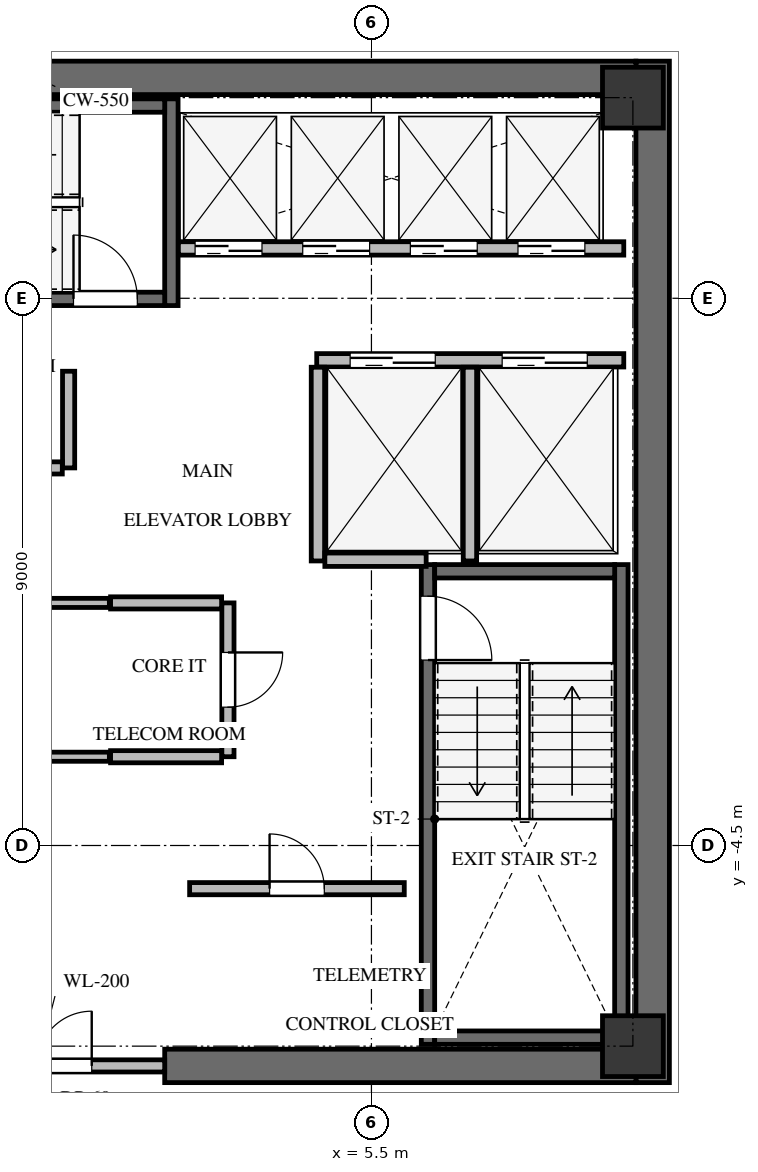
"""IFC4 building model, lengths in metres.
Left out: names, types, materials, properties, quantities, classifications, styles, units other than length and angle.
Written with IfcOpenShell. Run it as: python <this file> out.ifc"""

import sys

from ifc_helpers import new_model, si_unit, direction, frame, frame_2d, origin, origin_2d, place, context, subcontext, project, spatial, rectangle, extrude, source, transform, mapped, element, fill, save


model = new_model("IFC4")
c1 = context("Model", 3, precision=1e-05, world=origin(), true_north=direction((0.0, 1.0)))
c2 = subcontext(c1, "Body", "Model", "MODEL_VIEW")
j1 = project(units=[si_unit("LENGTHUNIT", "METRE"), si_unit("PLANEANGLEUNIT", "RADIAN")], contexts=[c1])
p1 = place(None, origin())
s1 = spatial("IfcSite", under=j1, at=p1, CompositionType="ELEMENT")
p2 = place(p1, origin())
s2 = spatial("IfcBuilding", under=s1, at=p2, CompositionType="ELEMENT")
p3 = place(p2, frame((0.0, 0.0, 218.3)))
s3 = spatial("IfcBuildingStorey", under=s2, at=p3, CompositionType="ELEMENT", Elevation=218.3)
p4 = place(p3, frame((10.125, -8.4, 0.0), z_axis=(0.0, 0.0, 1.0), x_axis=(0.0, 1.0, 0.0)))
e1 = element("IfcWall", 1, at=p4, inside=s3, PredefinedType="SHEAR", context=c2, shape_type="SweptSolid", body=[
    extrude(rectangle(XDim=16.8, YDim=0.55, at=frame_2d((8.4, 0.0))), origin(), (0.0, 0.0, 1.0), 3.3),
])
p5 = place(p3, frame((2.1, -8.125, 0.0), z_axis=(0.0, 0.0, 1.0), x_axis=(1.0, 0.0, 0.0)))
e2 = element("IfcWall", 2, at=p5, inside=s3, PredefinedType="SHEAR", context=c2, shape_type="SweptSolid", body=[
    extrude(rectangle(XDim=7.75, YDim=0.55, at=frame_2d((3.875, 0.0))), origin(), (0.0, 0.0, 1.0), 3.3),
])
p6 = place(p3, frame((-9.85, 8.125, 0.0), z_axis=(0.0, 0.0, 1.0), x_axis=(1.0, 0.0, 0.0)))
e3 = element("IfcWall", 3, at=p6, inside=s3, PredefinedType="SHEAR", context=c2, shape_type="SweptSolid", body=[
    extrude(rectangle(XDim=19.7, YDim=0.55, at=frame_2d((9.85, 0.0))), origin(), (0.0, 0.0, 1.0), 3.3),
])
p7 = place(p3, frame((9.61, -7.77, -0.24), z_axis=(0.0, 0.0, 1.0), x_axis=(0.0, 1.0, 0.0)))
e4 = element("IfcWall", 4, at=p7, inside=s3, PredefinedType="SHEAR", context=c2, shape_type="SweptSolid", body=[
    extrude(rectangle(XDim=7.89, YDim=0.22, at=frame_2d((3.945, 0.0))), origin(), (0.0, 0.0, 1.0), 3.3),
])
p8 = place(p3, frame((6.43, 0.12, -0.24), z_axis=(0.0, 0.0, 1.0), x_axis=(0.0, -1.0, 0.0)))
e5 = element("IfcWall", 5, at=p8, inside=s3, PredefinedType="SHEAR", context=c2, shape_type="SweptSolid", body=[
    extrude(rectangle(XDim=7.89, YDim=0.22, at=frame_2d((3.945, 0.0))), origin(), (0.0, 0.0, 1.0), 3.3),
])
p9 = place(p8, frame((0.52, 0.0, 0.0)))
e6 = element("IfcOpeningElement", 6, at=p9, cuts=e5, PredefinedType="OPENING", context=c2, shape_type="SweptSolid", body=[
    extrude(rectangle(XDim=1.05, YDim=2.15, at=frame_2d((0.525, 1.075))), frame((0.0, 0.12, 0.0), z_axis=(0.0, -1.0, 0.0), x_axis=(1.0, 0.0, 0.0)), (0.0, 0.0, 1.0), 0.24),
])
for number, where, z_axis, x_axis in (
    (7, (6.54, -7.66, -0.24), (0.0, 0.0, 1.0), (1.0, 0.0, 0.0)),
    (8, (9.5, 0.01, -0.24), (0.0, 0.0, 1.0), (-1.0, 0.0, 0.0)),
):
    element("IfcWall", number, at=place(p3, frame(where, z_axis=z_axis, x_axis=x_axis)), inside=s3, PredefinedType="SHEAR", context=c2, shape_type="SweptSolid", body=[
        extrude(rectangle(XDim=2.96, YDim=0.22, at=frame_2d((1.48, 0.0))), origin(), (0.0, 0.0, 1.0), 3.3),
    ])
p10 = place(p3, frame((2.21, 4.38, -0.24), z_axis=(0.0, 0.0, 1.0), x_axis=(0.0, 1.0, 0.0)))
e9 = element("IfcWall", 9, at=p10, inside=s3, PredefinedType="SHEAR", context=c2, shape_type="SweptSolid", body=[
    extrude(rectangle(XDim=3.4, YDim=0.22, at=frame_2d((1.7, 0.0))), origin(), (0.0, 0.0, 1.0), 3.3),
])
p11 = place(p3, frame((-5.25, 4.49, -0.24), z_axis=(0.0, 0.0, 1.0), x_axis=(1.0, 0.0, 0.0)))
e10 = element("IfcWall", 10, at=p11, inside=s3, PredefinedType="SHEAR", context=c2, shape_type="SweptSolid", body=[
    extrude(rectangle(XDim=7.35, YDim=0.22, at=frame_2d((3.675, 0.0))), origin(), (0.0, 0.0, 1.0), 3.3),
])
p12 = place(p11, frame((5.85, 0.0, 0.0)))
e11 = element("IfcOpeningElement", 11, at=p12, cuts=e10, PredefinedType="OPENING", context=c2, shape_type="SweptSolid", body=[
    extrude(rectangle(XDim=1.05, YDim=2.15, at=frame_2d((0.525, 1.075))), frame((0.0, 0.12, 0.0), z_axis=(0.0, -1.0, 0.0), x_axis=(1.0, 0.0, 0.0)), (0.0, 0.0, 1.0), 0.24),
])
p13 = place(p3, frame((2.1, 7.67, -0.24), z_axis=(0.0, 0.0, 1.0), x_axis=(-1.0, 0.0, 0.0)))
e12 = element("IfcWall", 12, at=p13, inside=s3, PredefinedType="SHEAR", context=c2, shape_type="SweptSolid", body=[
    extrude(rectangle(XDim=7.35, YDim=0.22, at=frame_2d((3.675, 0.0))), origin(), (0.0, 0.0, 1.0), 3.3),
])
m1 = source(origin(), c2, "Body", "SweptSolid", [
    extrude(rectangle(XDim=1.0, YDim=1.0, at=origin_2d()), origin(), (0.0, 0.0, 1.0), 3.3),
])
for number, where, z_axis, x_axis in (
    (13, (9.8, -7.8, -0.24), (0.0, 0.0, 1.0), (1.0, 0.0, 0.0)),
    (14, (9.8, 7.8, -0.24), (0.0, 0.0, 1.0), (1.0, 0.0, 0.0)),
):
    element("IfcColumn", number, at=place(p3, frame(where, z_axis=z_axis, x_axis=x_axis)), inside=s3, PredefinedType="COLUMN", context=c2, shape_type="MappedRepresentation", body=[
        mapped(m1, transform((0.0, 0.0, 0.0), x_axis=(1.0, 0.0, 0.0), y_axis=(0.0, 1.0, 0.0), z_axis=(0.0, 0.0, 1.0), scale=1.0)),
    ])
p14 = place(p3, frame((-2.1, -8.125, 0.0), z_axis=(0.0, 0.0, 1.0), x_axis=(1.0, 0.0, 0.0)))
e15 = element("IfcWall", 15, at=p14, inside=s3, PredefinedType="SOLIDWALL", context=c2, shape_type="SweptSolid", body=[
    extrude(rectangle(XDim=4.2, YDim=0.2, at=frame_2d((2.1, 0.0))), origin(), (0.0, 0.0, 1.0), 3.045),
])
p15 = place(p14, frame((1.2, 0.0, 0.0)))
e16 = element("IfcOpeningElement", 16, at=p15, cuts=e15, PredefinedType="OPENING", context=c2, shape_type="SweptSolid", body=[
    extrude(rectangle(XDim=1.8, YDim=2.15, at=frame_2d((0.9, 1.075))), frame((0.0, 0.11, 0.0), z_axis=(0.0, -1.0, 0.0), x_axis=(1.0, 0.0, 0.0)), (0.0, 0.0, 1.0), 0.22),
])
p16 = place(p3, frame((4.6, 3.48, 0.0), z_axis=(0.0, 0.0, 1.0), x_axis=(1.0, 0.0, 0.0)))
e17 = element("IfcWall", 17, at=p16, inside=s3, PredefinedType="SOLIDWALL", context=c2, shape_type="SweptSolid", body=[
    extrude(rectangle(XDim=5.05, YDim=0.22, at=frame_2d((2.525, 0.0))), origin(), (0.0, 0.0, 1.0), 3.045),
])
p17 = place(p16, frame((0.55, 0.0, 0.0)))
e18 = element("IfcOpeningElement", 18, at=p17, cuts=e17, PredefinedType="OPENING", context=c2, shape_type="SweptSolid", body=[
    extrude(rectangle(XDim=1.4, YDim=2.15, at=frame_2d((0.7, 1.075))), frame((0.0, 0.12, 0.0), z_axis=(0.0, -1.0, 0.0), x_axis=(1.0, 0.0, 0.0)), (0.0, 0.0, 1.0), 0.24),
])
p18 = place(p16, frame((3.05, 0.0, 0.0)))
e19 = element("IfcOpeningElement", 19, at=p18, cuts=e17, PredefinedType="OPENING", context=c2, shape_type="SweptSolid", body=[
    extrude(rectangle(XDim=1.4, YDim=2.15, at=frame_2d((0.7, 1.075))), frame((0.0, 0.12, 0.0), z_axis=(0.0, -1.0, 0.0), x_axis=(1.0, 0.0, 0.0)), (0.0, 0.0, 1.0), 0.24),
])
for number, where, z_axis, x_axis in (
    (20, (4.62, 0.18, 0.0), (0.0, 0.0, 1.0), (0.0, 1.0, 0.0)),
    (21, (7.12, 0.18, 0.0), (0.0, 0.0, 1.0), (0.0, 1.0, 0.0)),
):
    element("IfcWall", number, at=place(p3, frame(where, z_axis=z_axis, x_axis=x_axis)), inside=s3, PredefinedType="SOLIDWALL", context=c2, shape_type="SweptSolid", body=[
        extrude(rectangle(XDim=3.186, YDim=0.22, at=frame_2d((1.593, 0.0))), origin(), (0.0, 0.0, 1.0), 3.045),
    ])
p19 = place(p3, frame((4.734, 0.2, 0.0), z_axis=(0.0, 0.0, 1.0), x_axis=(1.0, 0.0, 0.0)))
e22 = element("IfcWall", 22, at=p19, inside=s3, PredefinedType="SOLIDWALL", context=c2, shape_type="SweptSolid", body=[
    extrude(rectangle(XDim=1.666, YDim=0.22, at=frame_2d((0.833, 0.0))), origin(), (0.0, 0.0, 1.0), 3.045),
])
p20 = place(p3, frame((2.325, 5.32, 0.0), z_axis=(0.0, 0.0, 1.0), x_axis=(1.0, 0.0, 0.0)))
e23 = element("IfcWall", 23, at=p20, inside=s3, PredefinedType="SOLIDWALL", context=c2, shape_type="SweptSolid", body=[
    extrude(rectangle(XDim=7.325, YDim=0.22, at=frame_2d((3.663, 0.0))), origin(), (0.0, 0.0, 1.0), 3.045),
])
p21 = place(p20, frame((0.275, 0.0, 0.0)))
e24 = element("IfcOpeningElement", 24, at=p21, cuts=e23, PredefinedType="OPENING", context=c2, shape_type="SweptSolid", body=[
    extrude(rectangle(XDim=1.1, YDim=2.15, at=frame_2d((0.55, 1.075))), frame((0.0, 0.12, 0.0), z_axis=(0.0, -1.0, 0.0), x_axis=(1.0, 0.0, 0.0)), (0.0, 0.0, 1.0), 0.24),
])
p22 = place(p20, frame((2.045, 0.0, 0.0)))
e25 = element("IfcOpeningElement", 25, at=p22, cuts=e23, PredefinedType="OPENING", context=c2, shape_type="SweptSolid", body=[
    extrude(rectangle(XDim=1.1, YDim=2.15, at=frame_2d((0.55, 1.075))), frame((0.0, 0.12, 0.0), z_axis=(0.0, -1.0, 0.0), x_axis=(1.0, 0.0, 0.0)), (0.0, 0.0, 1.0), 0.24),
])
p23 = place(p20, frame((3.815, 0.0, 0.0)))
e26 = element("IfcOpeningElement", 26, at=p23, cuts=e23, PredefinedType="OPENING", context=c2, shape_type="SweptSolid", body=[
    extrude(rectangle(XDim=1.1, YDim=2.15, at=frame_2d((0.55, 1.075))), frame((0.0, 0.12, 0.0), z_axis=(0.0, -1.0, 0.0), x_axis=(1.0, 0.0, 0.0)), (0.0, 0.0, 1.0), 0.24),
])
p24 = place(p20, frame((5.585, 0.0, 0.0)))
e27 = element("IfcOpeningElement", 27, at=p24, cuts=e23, PredefinedType="OPENING", context=c2, shape_type="SweptSolid", body=[
    extrude(rectangle(XDim=1.1, YDim=2.15, at=frame_2d((0.55, 1.075))), frame((0.0, 0.12, 0.0), z_axis=(0.0, -1.0, 0.0), x_axis=(1.0, 0.0, 0.0)), (0.0, 0.0, 1.0), 0.24),
])
p25 = place(p3, frame((2.51, -5.21, 0.0), z_axis=(0.0, 0.0, 1.0), x_axis=(1.0, 0.0, 0.0)))
e28 = element("IfcWall", 28, at=p25, inside=s3, PredefinedType="SOLIDWALL", context=c2, shape_type="SweptSolid", body=[
    extrude(rectangle(XDim=3.53, YDim=0.2, at=frame_2d((1.765, 0.0))), origin(), (0.0, 0.0, 1.0), 3.045),
])
p26 = place(p25, frame((1.315, 0.0, 0.0)))
e29 = element("IfcOpeningElement", 29, at=p26, cuts=e28, PredefinedType="OPENING", context=c2, shape_type="SweptSolid", body=[
    extrude(rectangle(XDim=0.9, YDim=2.05, at=frame_2d((0.45, 1.025))), frame((0.0, 0.11, 0.0), z_axis=(0.0, -1.0, 0.0), x_axis=(1.0, 0.0, 0.0)), (0.0, 0.0, 1.0), 0.22),
])
p27 = place(p3, frame((1.19, -3.04, 0.0), z_axis=(0.0, 0.0, 1.0), x_axis=(-1.0, 0.0, 0.0)))
e30 = element("IfcWall", 30, at=p27, inside=s3, PredefinedType="PARTITIONING", context=c2, shape_type="SweptSolid", body=[
    extrude(rectangle(XDim=5.53, YDim=0.15, at=frame_2d((2.765, 0.0))), origin(), (0.0, 0.0, 1.0), 3.045),
])
p28 = place(p27, frame((2.315, 0.0, 0.0)))
e31 = element("IfcOpeningElement", 31, at=p28, cuts=e30, PredefinedType="OPENING", context=c2, shape_type="SweptSolid", body=[
    extrude(rectangle(XDim=0.9, YDim=2.05, at=frame_2d((0.45, 1.025))), frame((0.0, 0.085, 0.0), z_axis=(0.0, -1.0, 0.0), x_axis=(1.0, 0.0, 0.0)), (0.0, 0.0, 1.0), 0.17),
])
p29 = place(p3, frame((-4.34, -0.51, 0.0), z_axis=(0.0, 0.0, 1.0), x_axis=(1.0, 0.0, 0.0)))
e32 = element("IfcWall", 32, at=p29, inside=s3, PredefinedType="PARTITIONING", context=c2, shape_type="SweptSolid", body=[
    extrude(rectangle(XDim=5.53, YDim=0.15, at=frame_2d((2.765, 0.0))), origin(), (0.0, 0.0, 1.0), 3.045),
])
p30 = place(p3, frame((3.14, -0.51, 0.0), z_axis=(0.0, 0.0, 1.0), x_axis=(0.0, -1.0, 0.0)))
e33 = element("IfcWall", 33, at=p30, inside=s3, PredefinedType="SOLIDWALL", context=c2, shape_type="SweptSolid", body=[
    extrude(rectangle(XDim=2.53, YDim=0.2, at=frame_2d((1.265, 0.0))), origin(), (0.0, 0.0, 1.0), 3.045),
])
p31 = place(p30, frame((0.815, 0.0, 0.0)))
e34 = element("IfcOpeningElement", 34, at=p31, cuts=e33, PredefinedType="OPENING", context=c2, shape_type="SweptSolid", body=[
    extrude(rectangle(XDim=0.9, YDim=2.05, at=frame_2d((0.45, 1.025))), frame((0.0, 0.11, 0.0), z_axis=(0.0, -1.0, 0.0), x_axis=(1.0, 0.0, 0.0)), (0.0, 0.0, 1.0), 0.22),
])
for number, where, z_axis, x_axis in (
    (35, (3.036, -3.04, 0.0), (0.0, 0.0, 1.0), (-1.0, 0.0, 0.0)),
    (36, (1.21, -0.51, 0.0), (0.0, 0.0, 1.0), (1.0, 0.0, 0.0)),
):
    element("IfcWall", number, at=place(p3, frame(where, z_axis=z_axis, x_axis=x_axis)), inside=s3, PredefinedType="SOLIDWALL", context=c2, shape_type="SweptSolid", body=[
        extrude(rectangle(XDim=1.826, YDim=0.2, at=frame_2d((0.913, 0.0))), origin(), (0.0, 0.0, 1.0), 3.045),
    ])
p32 = place(p3, frame((0.52, 3.3, 0.0), z_axis=(0.0, 0.0, 1.0), x_axis=(0.0, -1.0, 0.0)))
e37 = element("IfcWall", 37, at=p32, inside=s3, PredefinedType="SOLIDWALL", context=c2, shape_type="SweptSolid", body=[
    extrude(rectangle(XDim=1.59, YDim=0.2, at=frame_2d((0.795, 0.0))), origin(), (0.0, 0.0, 1.0), 3.045),
])
p33 = place(p3, frame((0.416, 1.71, 0.0), z_axis=(0.0, 0.0, 1.0), x_axis=(-1.0, 0.0, 0.0)))
e38 = element("IfcWall", 38, at=p33, inside=s3, PredefinedType="SOLIDWALL", context=c2, shape_type="SweptSolid", body=[
    extrude(rectangle(XDim=1.856, YDim=0.2, at=frame_2d((0.928, 0.0))), origin(), (0.0, 0.0, 1.0), 3.045),
])
p34 = place(p33, frame((0.478, 0.0, 0.0)))
e39 = element("IfcOpeningElement", 39, at=p34, cuts=e38, PredefinedType="OPENING", context=c2, shape_type="SweptSolid", body=[
    extrude(rectangle(XDim=0.9, YDim=2.05, at=frame_2d((0.45, 1.025))), frame((0.0, 0.11, 0.0), z_axis=(0.0, -1.0, 0.0), x_axis=(1.0, 0.0, 0.0)), (0.0, 0.0, 1.0), 0.22),
])
m2 = source(origin(), c2, "Body", "SweptSolid", [
    extrude(rectangle(XDim=1.05, YDim=2.15, at=frame_2d((0.525, 1.075))), frame((0.0, 0.025, 0.0), z_axis=(0.0, -1.0, 0.0), x_axis=(1.0, 0.0, 0.0)), (0.0, 0.0, 1.0), 0.05),
])
p35 = place(p9, origin())
e40 = element("IfcDoor", 40, at=p35, inside=s3, OperationType="SINGLE_SWING_RIGHT", PredefinedType="DOOR", context=c2, shape_type="MappedRepresentation", body=[
    mapped(m2, transform((0.0, 0.0, 0.0), x_axis=(1.0, 0.0, 0.0), y_axis=(0.0, 1.0, 0.0), z_axis=(0.0, 0.0, 1.0), scale=1.0)),
])
fill(e6, e40)
m3 = source(origin(), c2, "Body", "SweptSolid", [
    extrude(rectangle(XDim=1.05, YDim=2.15, at=frame_2d((0.525, 1.075))), frame((0.0, 0.025, 0.0), z_axis=(0.0, -1.0, 0.0), x_axis=(1.0, 0.0, 0.0)), (0.0, 0.0, 1.0), 0.05),
])
p36 = place(p12, origin())
e41 = element("IfcDoor", 41, at=p36, inside=s3, OperationType="SINGLE_SWING_LEFT", PredefinedType="DOOR", context=c2, shape_type="MappedRepresentation", body=[
    mapped(m3, transform((0.0, 0.0, 0.0), x_axis=(1.0, 0.0, 0.0), y_axis=(0.0, 1.0, 0.0), z_axis=(0.0, 0.0, 1.0), scale=1.0)),
])
fill(e11, e41)
m4 = source(origin(), c2, "Body", "SweptSolid", [
    extrude(rectangle(XDim=1.8, YDim=2.15, at=frame_2d((0.9, 1.075))), frame((0.0, 0.025, 0.0), z_axis=(0.0, -1.0, 0.0), x_axis=(1.0, 0.0, 0.0)), (0.0, 0.0, 1.0), 0.05),
])
p37 = place(p15, origin())
e42 = element("IfcDoor", 42, at=p37, inside=s3, OperationType="DOUBLE_DOOR_SINGLE_SWING", PredefinedType="DOOR", context=c2, shape_type="MappedRepresentation", body=[
    mapped(m4, transform((0.0, 0.0, 0.0), x_axis=(1.0, 0.0, 0.0), y_axis=(0.0, 1.0, 0.0), z_axis=(0.0, 0.0, 1.0), scale=1.0)),
])
fill(e16, e42)
m5 = source(origin(), c2, "Body", "SweptSolid", [
    extrude(rectangle(XDim=1.4, YDim=2.15, at=frame_2d((0.7, 1.075))), frame((0.0, 0.025, 0.0), z_axis=(0.0, -1.0, 0.0), x_axis=(1.0, 0.0, 0.0)), (0.0, 0.0, 1.0), 0.05),
])
p38 = place(p17, origin())
e43 = element("IfcDoor", 43, at=p38, inside=s3, OperationType="DOUBLE_DOOR_SLIDING", PredefinedType="DOOR", context=c2, shape_type="MappedRepresentation", body=[
    mapped(m5, transform((0.0, 0.0, 0.0), x_axis=(1.0, 0.0, 0.0), y_axis=(0.0, 1.0, 0.0), z_axis=(0.0, 0.0, 1.0), scale=1.0)),
])
fill(e18, e43)
p39 = place(p18, origin())
e44 = element("IfcDoor", 44, at=p39, inside=s3, OperationType="DOUBLE_DOOR_SLIDING", PredefinedType="DOOR", context=c2, shape_type="MappedRepresentation", body=[
    mapped(m5, transform((0.0, 0.0, 0.0), x_axis=(1.0, 0.0, 0.0), y_axis=(0.0, 1.0, 0.0), z_axis=(0.0, 0.0, 1.0), scale=1.0)),
])
fill(e19, e44)
m6 = source(origin(), c2, "Body", "SweptSolid", [
    extrude(rectangle(XDim=1.1, YDim=2.15, at=frame_2d((0.55, 1.075))), frame((0.0, 0.025, 0.0), z_axis=(0.0, -1.0, 0.0), x_axis=(1.0, 0.0, 0.0)), (0.0, 0.0, 1.0), 0.05),
])
p40 = place(p21, origin())
e45 = element("IfcDoor", 45, at=p40, inside=s3, OperationType="DOUBLE_DOOR_SLIDING", PredefinedType="DOOR", context=c2, shape_type="MappedRepresentation", body=[
    mapped(m6, transform((0.0, 0.0, 0.0), x_axis=(1.0, 0.0, 0.0), y_axis=(0.0, 1.0, 0.0), z_axis=(0.0, 0.0, 1.0), scale=1.0)),
])
fill(e24, e45)
p41 = place(p22, origin())
e46 = element("IfcDoor", 46, at=p41, inside=s3, OperationType="DOUBLE_DOOR_SLIDING", PredefinedType="DOOR", context=c2, shape_type="MappedRepresentation", body=[
    mapped(m6, transform((0.0, 0.0, 0.0), x_axis=(1.0, 0.0, 0.0), y_axis=(0.0, 1.0, 0.0), z_axis=(0.0, 0.0, 1.0), scale=1.0)),
])
fill(e25, e46)
p42 = place(p23, origin())
e47 = element("IfcDoor", 47, at=p42, inside=s3, OperationType="DOUBLE_DOOR_SLIDING", PredefinedType="DOOR", context=c2, shape_type="MappedRepresentation", body=[
    mapped(m6, transform((0.0, 0.0, 0.0), x_axis=(1.0, 0.0, 0.0), y_axis=(0.0, 1.0, 0.0), z_axis=(0.0, 0.0, 1.0), scale=1.0)),
])
fill(e26, e47)
p43 = place(p24, origin())
e48 = element("IfcDoor", 48, at=p43, inside=s3, OperationType="DOUBLE_DOOR_SLIDING", PredefinedType="DOOR", context=c2, shape_type="MappedRepresentation", body=[
    mapped(m6, transform((0.0, 0.0, 0.0), x_axis=(1.0, 0.0, 0.0), y_axis=(0.0, 1.0, 0.0), z_axis=(0.0, 0.0, 1.0), scale=1.0)),
])
fill(e27, e48)
m7 = source(origin(), c2, "Body", "SweptSolid", [
    extrude(rectangle(XDim=0.9, YDim=2.05, at=frame_2d((0.45, 1.025))), frame((0.0, 0.025, 0.0), z_axis=(0.0, -1.0, 0.0), x_axis=(1.0, 0.0, 0.0)), (0.0, 0.0, 1.0), 0.05),
])
p44 = place(p26, origin())
e49 = element("IfcDoor", 49, at=p44, inside=s3, OperationType="SINGLE_SWING_LEFT", PredefinedType="DOOR", context=c2, shape_type="MappedRepresentation", body=[
    mapped(m7, transform((0.0, 0.0, 0.0), x_axis=(1.0, 0.0, 0.0), y_axis=(0.0, 1.0, 0.0), z_axis=(0.0, 0.0, 1.0), scale=1.0)),
])
fill(e29, e49)
p45 = place(p31, origin())
e50 = element("IfcDoor", 50, at=p45, inside=s3, OperationType="SINGLE_SWING_LEFT", PredefinedType="DOOR", context=c2, shape_type="MappedRepresentation", body=[
    mapped(m7, transform((0.0, 0.0, 0.0), x_axis=(1.0, 0.0, 0.0), y_axis=(0.0, 1.0, 0.0), z_axis=(0.0, 0.0, 1.0), scale=1.0)),
])
fill(e34, e50)
save(model, sys.argv[1])
